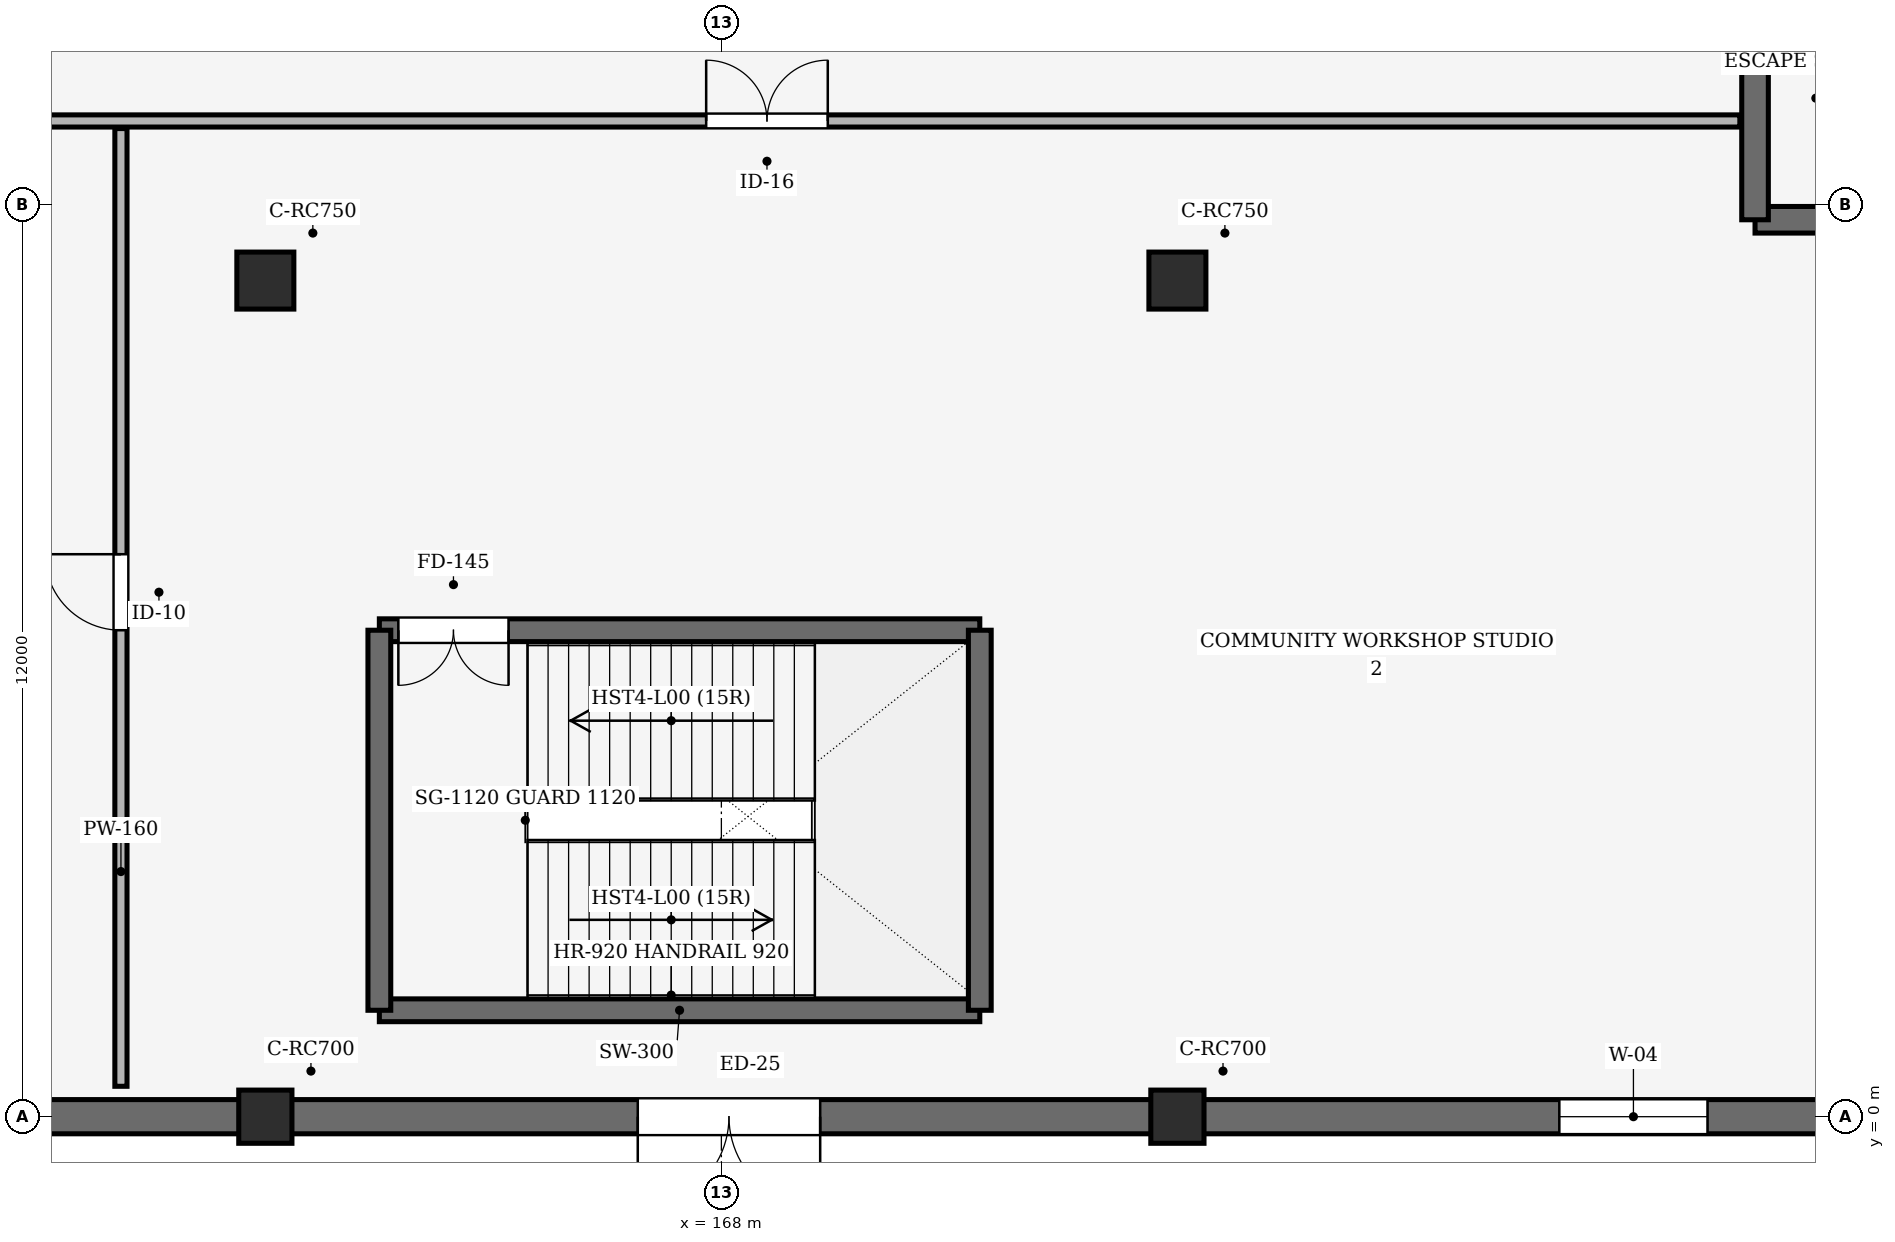
"""IFC4 building model, lengths in metres.
Left out: names, types, materials, properties, quantities, classifications, styles, units other than length and angle.
Written with IfcOpenShell. Run it as: python <this file> out.ifc"""

import sys

from ifc_helpers import new_model, si_unit, direction, frame, frame_2d, origin, origin_2d, place, context, subcontext, project, spatial, rectangle, extrude, element, fill, save


model = new_model("IFC4")
c1 = context("Model", 3, precision=1e-05, world=origin(), true_north=direction((0.0, 1.0)))
c2 = subcontext(c1, "Body", "Model", "MODEL_VIEW")
j1 = project(units=[si_unit("LENGTHUNIT", "METRE"), si_unit("PLANEANGLEUNIT", "RADIAN")], contexts=[c1])
p1 = place(None, origin())
s1 = spatial("IfcSite", under=j1, at=p1, CompositionType="ELEMENT")
p2 = place(p1, origin())
s2 = spatial("IfcBuilding", under=s1, at=p2, CompositionType="ELEMENT")
p3 = place(p2, origin())
s3 = spatial("IfcBuildingStorey", under=s2, at=p3, CompositionType="ELEMENT", Elevation=0.0)
p4 = place(p3, frame((162.0, 0.0, 0.0), z_axis=(0.0, 0.0, 1.0), x_axis=(1.0, 0.0, 0.0)))
e1 = element("IfcColumn", 1, at=p4, inside=s3, PredefinedType="COLUMN", context=c2, shape_type="SweptSolid", body=[
    extrude(rectangle(XDim=0.7, YDim=0.7, at=origin_2d()), origin(), (0.0, 0.0, 1.0), 5.4),
])
p5 = place(p3, frame((162.0, 11.0, 0.0), z_axis=(0.0, 0.0, 1.0), x_axis=(1.0, 0.0, 0.0)))
e2 = element("IfcColumn", 2, at=p5, inside=s3, PredefinedType="COLUMN", context=c2, shape_type="SweptSolid", body=[
    extrude(rectangle(XDim=0.75, YDim=0.75, at=origin_2d()), origin(), (0.0, 0.0, 1.0), 5.4),
])
p6 = place(p3, frame((174.0, 0.0, 0.0), z_axis=(0.0, 0.0, 1.0), x_axis=(1.0, 0.0, 0.0)))
e3 = element("IfcColumn", 3, at=p6, inside=s3, PredefinedType="COLUMN", context=c2, shape_type="SweptSolid", body=[
    extrude(rectangle(XDim=0.7, YDim=0.7, at=origin_2d()), origin(), (0.0, 0.0, 1.0), 5.4),
])
p7 = place(p3, frame((174.0, 11.0, 0.0), z_axis=(0.0, 0.0, 1.0), x_axis=(1.0, 0.0, 0.0)))
e4 = element("IfcColumn", 4, at=p7, inside=s3, PredefinedType="COLUMN", context=c2, shape_type="SweptSolid", body=[
    extrude(rectangle(XDim=0.75, YDim=0.75, at=origin_2d()), origin(), (0.0, 0.0, 1.0), 5.4),
])
p8 = place(p3, frame((150.0, 0.0, 0.0), z_axis=(0.0, 0.0, 1.0), x_axis=(1.0, 0.0, 0.0)))
e5 = element("IfcWall", 5, at=p8, inside=s3, PredefinedType="SOLIDWALL", context=c2, shape_type="SweptSolid", body=[
    extrude(rectangle(XDim=12.0, YDim=0.45, at=frame_2d((6.0, 0.0))), origin(), (0.0, 0.0, 1.0), 4.3),
])
p9 = place(p8, frame((5.025, 0.0, 0.85)))
e6 = element("IfcOpeningElement", 6, at=p9, cuts=e5, PredefinedType="OPENING", context=c2, shape_type="SweptSolid", body=[
    extrude(rectangle(XDim=1.95, YDim=2.8, at=frame_2d((0.975, 1.4))), frame((0.0, 0.235, 0.0), z_axis=(0.0, -1.0, 0.0), x_axis=(1.0, 0.0, 0.0)), (0.0, 0.0, 1.0), 0.47),
])
p10 = place(p3, frame((162.0, 0.0, 0.0), z_axis=(0.0, 0.0, 1.0), x_axis=(1.0, 0.0, 0.0)))
e7 = element("IfcWall", 7, at=p10, inside=s3, PredefinedType="SOLIDWALL", context=c2, shape_type="SweptSolid", body=[
    extrude(rectangle(XDim=12.0, YDim=0.45, at=frame_2d((6.0, 0.0))), origin(), (0.0, 0.0, 1.0), 4.3),
])
p11 = place(p10, frame((4.9, 0.0, 0.0)))
e8 = element("IfcOpeningElement", 8, at=p11, cuts=e7, PredefinedType="OPENING", context=c2, shape_type="SweptSolid", body=[
    extrude(rectangle(XDim=2.4, YDim=2.65, at=frame_2d((1.2, 1.325))), frame((0.0, 0.235, 0.0), z_axis=(0.0, -1.0, 0.0), x_axis=(1.0, 0.0, 0.0)), (0.0, 0.0, 1.0), 0.47),
])
p12 = place(p3, frame((174.0, 0.0, 0.0), z_axis=(0.0, 0.0, 1.0), x_axis=(1.0, 0.0, 0.0)))
e9 = element("IfcWall", 9, at=p12, inside=s3, PredefinedType="SOLIDWALL", context=c2, shape_type="SweptSolid", body=[
    extrude(rectangle(XDim=12.0, YDim=0.45, at=frame_2d((6.0, 0.0))), origin(), (0.0, 0.0, 1.0), 4.3),
])
p13 = place(p12, frame((5.025, 0.0, 0.85)))
e10 = element("IfcOpeningElement", 10, at=p13, cuts=e9, PredefinedType="OPENING", context=c2, shape_type="SweptSolid", body=[
    extrude(rectangle(XDim=1.95, YDim=2.8, at=frame_2d((0.975, 1.4))), frame((0.0, 0.235, 0.0), z_axis=(0.0, -1.0, 0.0), x_axis=(1.0, 0.0, 0.0)), (0.0, 0.0, 1.0), 0.47),
])
p14 = place(p3, frame((181.6, 11.8, 0.0), z_axis=(0.0, 0.0, 1.0), x_axis=(1.0, 0.0, 0.0)))
e11 = element("IfcWall", 11, at=p14, inside=s3, PredefinedType="SHEAR", context=c2, shape_type="SweptSolid", body=[
    extrude(rectangle(XDim=10.2, YDim=0.35, at=frame_2d((5.1, 0.0))), origin(), (0.0, 0.0, 1.0), 5.4),
])
p15 = place(p3, frame((181.6, 20.2, 0.0), z_axis=(0.0, 0.0, 1.0), x_axis=(0.0, -1.0, 0.0)))
e12 = element("IfcWall", 12, at=p15, inside=s3, PredefinedType="SHEAR", context=c2, shape_type="SweptSolid", body=[
    extrude(rectangle(XDim=8.4, YDim=0.35, at=frame_2d((4.2, 0.0))), origin(), (0.0, 0.0, 1.0), 5.4),
])
p16 = place(p15, frame((2.95, 0.0, 0.0)))
e13 = element("IfcOpeningElement", 13, at=p16, cuts=e12, PredefinedType="OPENING", context=c2, shape_type="SweptSolid", body=[
    extrude(rectangle(XDim=1.15, YDim=2.15, at=frame_2d((0.575, 1.075))), frame((0.0, 0.185, 0.0), z_axis=(0.0, -1.0, 0.0), x_axis=(1.0, 0.0, 0.0)), (0.0, 0.0, 1.0), 0.37),
])
p17 = place(p3, frame((163.5, 1.4, 0.0), z_axis=(0.0, 0.0, 1.0), x_axis=(1.0, 0.0, 0.0)))
e14 = element("IfcWall", 14, at=p17, inside=s3, PredefinedType="SHEAR", context=c2, shape_type="SweptSolid", body=[
    extrude(rectangle(XDim=7.9, YDim=0.3, at=frame_2d((3.95, 0.0))), origin(), (0.0, 0.0, 1.0), 5.4),
])
p18 = place(p3, frame((171.4, 6.4, 0.0), z_axis=(0.0, 0.0, 1.0), x_axis=(-1.0, 0.0, 0.0)))
e15 = element("IfcWall", 15, at=p18, inside=s3, PredefinedType="SHEAR", context=c2, shape_type="SweptSolid", body=[
    extrude(rectangle(XDim=7.9, YDim=0.3, at=frame_2d((3.95, 0.0))), origin(), (0.0, 0.0, 1.0), 5.4),
])
p19 = place(p18, frame((6.2, 0.0, 0.0)))
e16 = element("IfcOpeningElement", 16, at=p19, cuts=e15, PredefinedType="OPENING", context=c2, shape_type="SweptSolid", body=[
    extrude(rectangle(XDim=1.45, YDim=2.15, at=frame_2d((0.725, 1.075))), frame((0.0, 0.16, 0.0), z_axis=(0.0, -1.0, 0.0), x_axis=(1.0, 0.0, 0.0)), (0.0, 0.0, 1.0), 0.32),
])
for number, where, z_axis, x_axis in (
    (17, (163.5, 6.4, 0.0), (0.0, 0.0, 1.0), (0.0, -1.0, 0.0)),
    (18, (171.4, 1.4, 0.0), (0.0, 0.0, 1.0), (0.0, 1.0, 0.0)),
):
    element("IfcWall", number, at=place(p3, frame(where, z_axis=z_axis, x_axis=x_axis)), inside=s3, PredefinedType="SHEAR", context=c2, shape_type="SweptSolid", body=[
        extrude(rectangle(XDim=5.0, YDim=0.3, at=frame_2d((2.5, 0.0))), origin(), (0.0, 0.0, 1.0), 5.4),
    ])
p20 = place(p3, frame((160.1, 0.4, 0.0), z_axis=(0.0, 0.0, 1.0), x_axis=(0.0, 1.0, 0.0)))
e19 = element("IfcWall", 19, at=p20, inside=s3, PredefinedType="PARTITIONING", context=c2, shape_type="SweptSolid", body=[
    extrude(rectangle(XDim=12.6, YDim=0.16, at=frame_2d((6.3, 0.0))), origin(), (0.0, 0.0, 1.0), 3.6),
])
p21 = place(p20, frame((6.0, 0.0, 0.0)))
e20 = element("IfcOpeningElement", 20, at=p21, cuts=e19, PredefinedType="OPENING", context=c2, shape_type="SweptSolid", body=[
    extrude(rectangle(XDim=1.0, YDim=2.15, at=frame_2d((0.5, 1.075))), frame((0.0, 0.09, 0.0), z_axis=(0.0, -1.0, 0.0), x_axis=(1.0, 0.0, 0.0)), (0.0, 0.0, 1.0), 0.18),
])
p22 = place(p3, frame((137.8, 13.1, 0.0), z_axis=(0.0, 0.0, 1.0), x_axis=(1.0, 0.0, 0.0)))
e21 = element("IfcWall", 21, at=p22, inside=s3, PredefinedType="PARTITIONING", context=c2, shape_type="SweptSolid", body=[
    extrude(rectangle(XDim=43.6, YDim=0.16, at=frame_2d((21.8, 0.0))), origin(), (0.0, 0.0, 1.0), 3.6),
])
p23 = place(p22, frame((8.0, 0.0, 0.0)))
e22 = element("IfcOpeningElement", 22, at=p23, cuts=e21, PredefinedType="OPENING", context=c2, shape_type="SweptSolid", body=[
    extrude(rectangle(XDim=1.6, YDim=2.2, at=frame_2d((0.8, 1.1))), frame((0.0, 0.09, 0.0), z_axis=(0.0, -1.0, 0.0), x_axis=(1.0, 0.0, 0.0)), (0.0, 0.0, 1.0), 0.18),
])
p24 = place(p22, frame((30.0, 0.0, 0.0)))
e23 = element("IfcOpeningElement", 23, at=p24, cuts=e21, PredefinedType="OPENING", context=c2, shape_type="SweptSolid", body=[
    extrude(rectangle(XDim=1.6, YDim=2.2, at=frame_2d((0.8, 1.1))), frame((0.0, 0.09, 0.0), z_axis=(0.0, -1.0, 0.0), x_axis=(1.0, 0.0, 0.0)), (0.0, 0.0, 1.0), 0.18),
])
p25 = place(p11, frame((2.4, 0.0, 0.0), z_axis=(0.0, 0.0, 1.0), x_axis=(-1.0, 0.0, 0.0)))
e24 = element("IfcDoor", 24, at=p25, inside=s3, OperationType="DOUBLE_DOOR_SINGLE_SWING", PredefinedType="DOOR", context=c2, shape_type="SweptSolid", body=[
    extrude(rectangle(XDim=2.4, YDim=2.65, at=frame_2d((1.2, 1.325))), frame((0.0, 0.025, 0.0), z_axis=(0.0, -1.0, 0.0), x_axis=(1.0, 0.0, 0.0)), (0.0, 0.0, 1.0), 0.05),
])
fill(e8, e24)
p26 = place(p13, origin())
e25 = element("IfcWindow", 25, at=p26, inside=s3, PartitioningType="DOUBLE_PANEL_VERTICAL", PredefinedType="WINDOW", context=c2, shape_type="SweptSolid", body=[
    extrude(rectangle(XDim=1.95, YDim=2.8, at=frame_2d((0.975, 1.4))), frame((0.0, 0.03, 0.0), z_axis=(0.0, -1.0, 0.0), x_axis=(1.0, 0.0, 0.0)), (0.0, 0.0, 1.0), 0.06),
])
fill(e10, e25)
p27 = place(p19, origin())
e26 = element("IfcDoor", 26, at=p27, inside=s3, OperationType="DOUBLE_DOOR_SINGLE_SWING", PredefinedType="DOOR", context=c2, shape_type="SweptSolid", body=[
    extrude(rectangle(XDim=1.45, YDim=2.15, at=frame_2d((0.725, 1.075))), frame((0.0, 0.025, 0.0), z_axis=(0.0, -1.0, 0.0), x_axis=(1.0, 0.0, 0.0)), (0.0, 0.0, 1.0), 0.05),
])
fill(e16, e26)
p28 = place(p21, origin())
e27 = element("IfcDoor", 27, at=p28, inside=s3, OperationType="SINGLE_SWING_RIGHT", PredefinedType="DOOR", context=c2, shape_type="SweptSolid", body=[
    extrude(rectangle(XDim=1.0, YDim=2.15, at=frame_2d((0.5, 1.075))), frame((0.0, 0.025, 0.0), z_axis=(0.0, -1.0, 0.0), x_axis=(1.0, 0.0, 0.0)), (0.0, 0.0, 1.0), 0.05),
])
fill(e20, e27)
p29 = place(p24, origin())
e28 = element("IfcDoor", 28, at=p29, inside=s3, OperationType="DOUBLE_DOOR_SINGLE_SWING", PredefinedType="DOOR", context=c2, shape_type="SweptSolid", body=[
    extrude(rectangle(XDim=1.6, YDim=2.2, at=frame_2d((0.8, 1.1))), frame((0.0, 0.025, 0.0), z_axis=(0.0, -1.0, 0.0), x_axis=(1.0, 0.0, 0.0)), (0.0, 0.0, 1.0), 0.05),
])
fill(e23, e28)
save(model, sys.argv[1])
